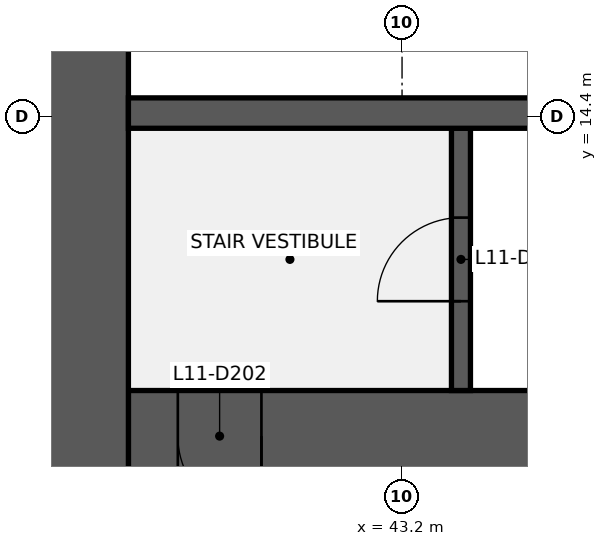
"""IFC4 building model, lengths in metres.
Left out: names, types, materials, properties, quantities, classifications, styles, units other than length and angle.
Written with IfcOpenShell. Run it as: python <this file> out.ifc"""

import sys

from ifc_helpers import new_model, si_unit, direction, frame, frame_2d, origin, place, context, subcontext, project, spatial, rectangle, extrude, element, fill, save


model = new_model("IFC4")
c1 = context("Model", 3, precision=1e-05, world=origin(), true_north=direction((0.0, 1.0)))
c2 = subcontext(c1, "Body", "Model", "MODEL_VIEW")
j1 = project(units=[si_unit("LENGTHUNIT", "METRE"), si_unit("PLANEANGLEUNIT", "RADIAN")], contexts=[c1])
p1 = place(None, origin())
s1 = spatial("IfcSite", under=j1, at=p1, CompositionType="ELEMENT")
p2 = place(p1, origin())
s2 = spatial("IfcBuilding", under=s1, at=p2, CompositionType="ELEMENT")
p3 = place(p2, frame((0.0, 0.0, 55.0)))
s3 = spatial("IfcBuildingStorey", under=s2, at=p3, CompositionType="ELEMENT", Elevation=55.0)
p4 = place(p3, frame((52.8, 10.2, 0.0), z_axis=(0.0, 0.0, 1.0), x_axis=(-1.0, 0.0, 0.0)))
e1 = element("IfcWall", 1, at=p4, inside=s3, PredefinedType="SHEAR", context=c2, shape_type="SweptSolid", body=[
    extrude(rectangle(XDim=13.2, YDim=1.2, at=frame_2d((6.6, 0.0))), origin(), (0.0, 0.0, 1.0), 3.84),
])
p5 = place(p4, frame((11.45, 0.0, 0.0)))
e2 = element("IfcOpeningElement", 2, at=p5, cuts=e1, PredefinedType="OPENING", context=c2, shape_type="SweptSolid", body=[
    extrude(rectangle(XDim=1.1, YDim=2.1, at=frame_2d((0.55, 1.05))), frame((0.0, 0.61, 0.0), z_axis=(0.0, -1.0, 0.0), x_axis=(1.0, 0.0, 0.0)), (0.0, 0.0, 1.0), 1.22),
])
p6 = place(p3, frame((39.0, 9.6, 0.0), z_axis=(0.0, 0.0, 1.0), x_axis=(0.0, 1.0, 0.0)))
e3 = element("IfcWall", 3, at=p6, inside=s3, PredefinedType="SHEAR", context=c2, shape_type="SweptSolid", body=[
    extrude(rectangle(XDim=28.8, YDim=1.2, at=frame_2d((14.4, 0.0))), origin(), (0.0, 0.0, 1.0), 3.84),
])
p7 = place(p6, frame((8.7, 0.0, 0.0)))
e4 = element("IfcOpeningElement", 4, at=p7, cuts=e3, PredefinedType="OPENING", context=c2, shape_type="SweptSolid", body=[
    extrude(rectangle(XDim=1.8, YDim=2.1, at=frame_2d((0.9, 1.05))), frame((0.0, 0.61, 0.0), z_axis=(0.0, -1.0, 0.0), x_axis=(1.0, 0.0, 0.0)), (0.0, 0.0, 1.0), 1.22),
])
p8 = place(p6, frame((18.3, 0.0, 0.0)))
e5 = element("IfcOpeningElement", 5, at=p8, cuts=e3, PredefinedType="OPENING", context=c2, shape_type="SweptSolid", body=[
    extrude(rectangle(XDim=1.8, YDim=2.1, at=frame_2d((0.9, 1.05))), frame((0.0, 0.61, 0.0), z_axis=(0.0, -1.0, 0.0), x_axis=(1.0, 0.0, 0.0)), (0.0, 0.0, 1.0), 1.22),
])
p9 = place(p3, frame((43.975, 10.8, 0.0), z_axis=(0.0, 0.0, 1.0), x_axis=(0.0, 1.0, 0.0)))
e6 = element("IfcWall", 6, at=p9, inside=s3, PredefinedType="SHEAR", context=c2, shape_type="SweptSolid", body=[
    extrude(rectangle(XDim=3.45, YDim=0.25, at=frame_2d((1.725, 0.0))), origin(), (0.0, 0.0, 1.0), 3.84),
])
p10 = place(p9, frame((1.175, 0.0, 0.0)))
e7 = element("IfcOpeningElement", 7, at=p10, cuts=e6, PredefinedType="OPENING", context=c2, shape_type="SweptSolid", body=[
    extrude(rectangle(XDim=1.1, YDim=2.1, at=frame_2d((0.55, 1.05))), frame((0.0, 0.135, 0.0), z_axis=(0.0, -1.0, 0.0), x_axis=(1.0, 0.0, 0.0)), (0.0, 0.0, 1.0), 0.27),
])
p11 = place(p3, frame((39.6, 14.45, 0.0), z_axis=(0.0, 0.0, 1.0), x_axis=(1.0, 0.0, 0.0)))
e8 = element("IfcWall", 8, at=p11, inside=s3, PredefinedType="SHEAR", context=c2, shape_type="SweptSolid", body=[
    extrude(rectangle(XDim=16.8, YDim=0.4, at=frame_2d((8.4, 0.0))), origin(), (0.0, 0.0, 1.0), 3.84),
])
p12 = place(p10, origin())
e9 = element("IfcDoor", 9, at=p12, inside=s3, OperationType="SINGLE_SWING_LEFT", PredefinedType="DOOR", context=c2, shape_type="SweptSolid", body=[
    extrude(rectangle(XDim=1.1, YDim=2.1, at=frame_2d((0.55, 1.05))), frame((0.0, 0.025, 0.0), z_axis=(0.0, -1.0, 0.0), x_axis=(1.0, 0.0, 0.0)), (0.0, 0.0, 1.0), 0.05),
])
fill(e7, e9)
p13 = place(p5, origin())
e10 = element("IfcDoor", 10, at=p13, inside=s3, OperationType="SINGLE_SWING_LEFT", PredefinedType="DOOR", context=c2, shape_type="SweptSolid", body=[
    extrude(rectangle(XDim=1.1, YDim=2.1, at=frame_2d((0.55, 1.05))), frame((0.0, 0.025, 0.0), z_axis=(0.0, -1.0, 0.0), x_axis=(1.0, 0.0, 0.0)), (0.0, 0.0, 1.0), 0.05),
])
fill(e2, e10)
save(model, sys.argv[1])
